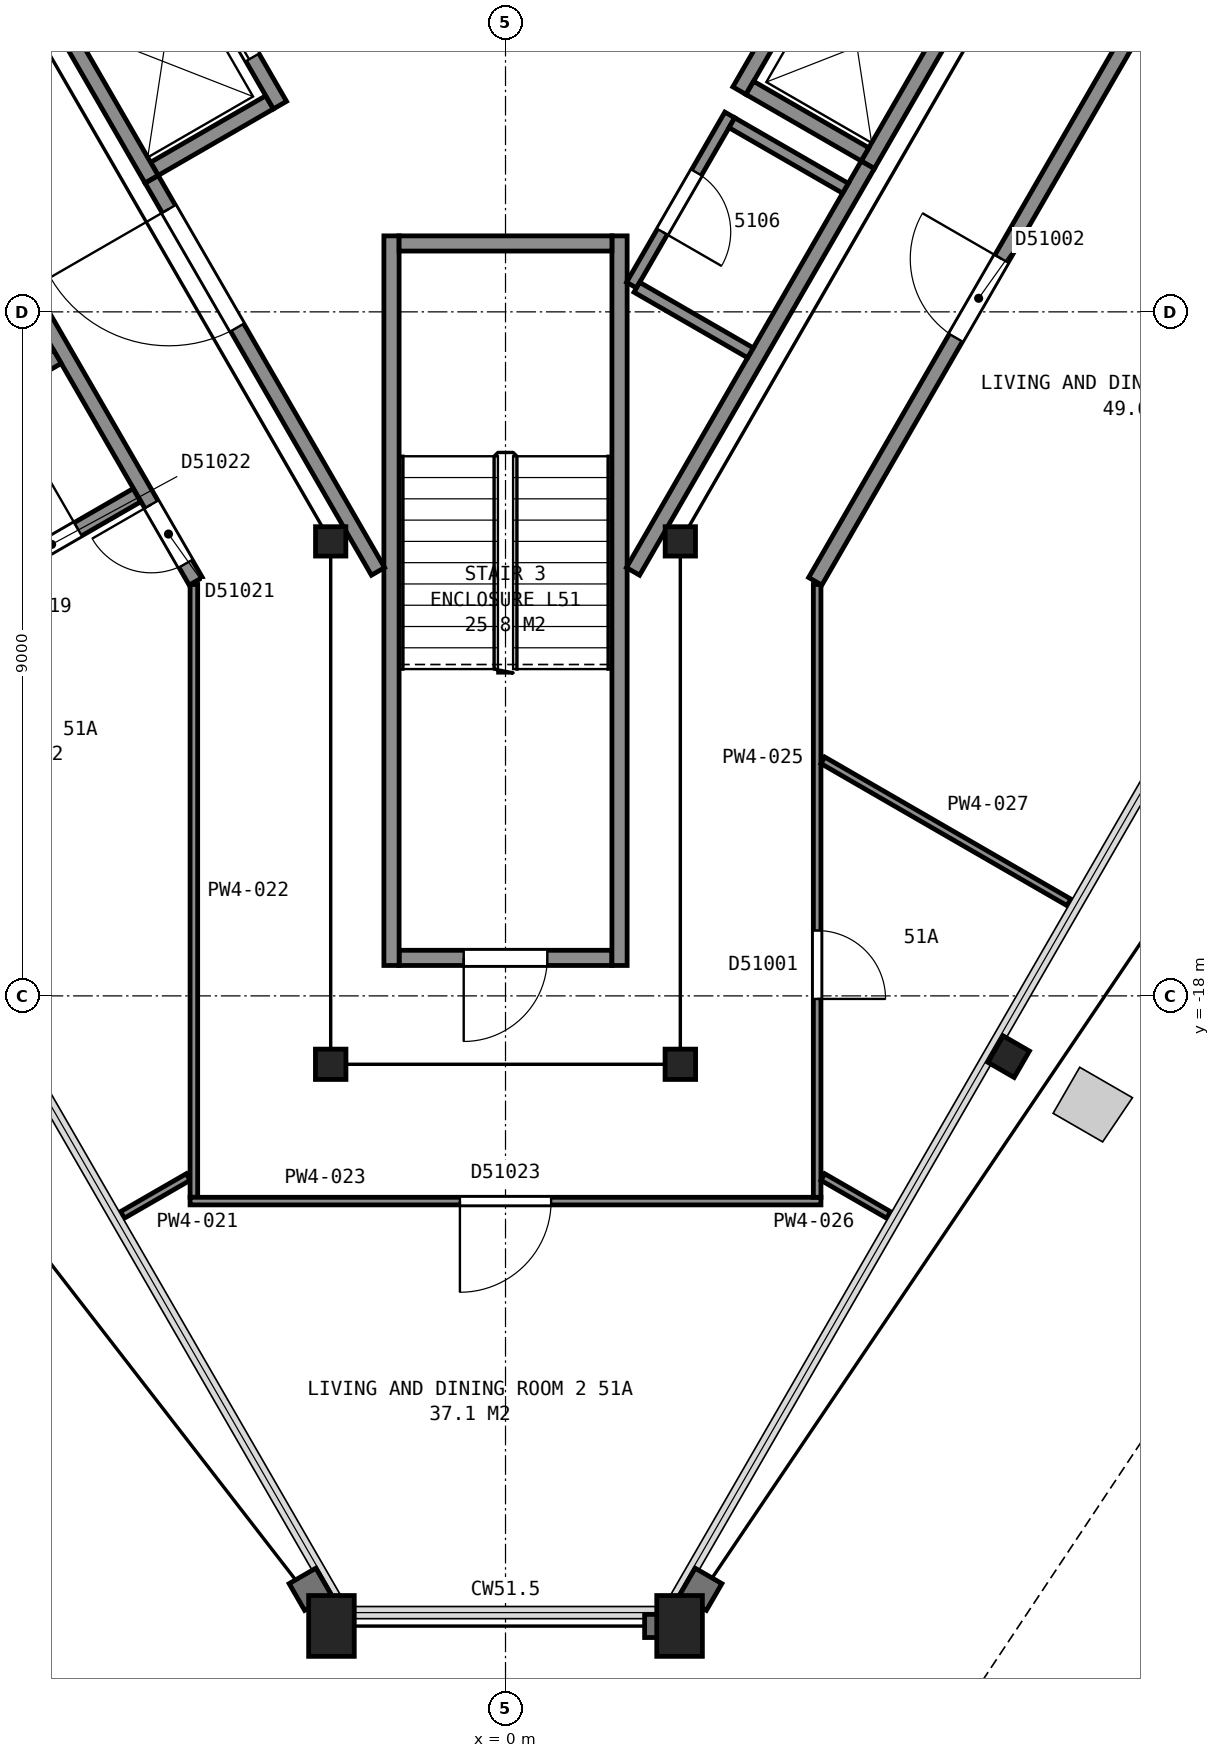
"""IFC4 building model, lengths in metres.
Left out: names, types, materials, properties, quantities, classifications, styles, units other than length and angle.
Written with IfcOpenShell. Run it as: python <this file> out.ifc"""

import sys

from ifc_helpers import new_model, si_unit, direction, frame, frame_2d, origin, origin_2d, place, context, subcontext, project, spatial, rectangle, hollow_rectangle, i_section, extrude, element, fill, save


model = new_model("IFC4")
c1 = context("Model", 3, precision=1e-05, world=origin(), true_north=direction((0.0, 1.0)))
c2 = subcontext(c1, "Body", "Model", "MODEL_VIEW")
j1 = project(units=[si_unit("LENGTHUNIT", "METRE"), si_unit("PLANEANGLEUNIT", "RADIAN")], contexts=[c1])
p1 = place(None, origin())
s1 = spatial("IfcSite", under=j1, at=p1, CompositionType="ELEMENT")
p2 = place(p1, origin())
s2 = spatial("IfcBuilding", under=s1, at=p2, CompositionType="ELEMENT")
p3 = place(p2, frame((0.0, 0.0, 206.4)))
s3 = spatial("IfcBuildingStorey", under=s2, at=p3, CompositionType="ELEMENT", Elevation=206.4)
for number, where, z_axis, x_axis in (
    (1, (-2.29, -26.29, 0.0), (0.0, 0.0, 1.0), (-1.0, 0.0, 0.0)),
    (2, (2.29, -26.29, 0.0), (0.0, 0.0, 1.0), (-1.0, 0.0, 0.0)),
):
    element("IfcColumn", number, at=place(p3, frame(where, z_axis=z_axis, x_axis=x_axis)), inside=s3, PredefinedType="COLUMN", context=c2, shape_type="SweptSolid", body=[
        extrude(hollow_rectangle(XDim=0.6, YDim=0.8, WallThickness=0.05, at=origin_2d()), origin(), (0.0, 0.0, 1.0), 3.7),
    ])
p4 = place(p3, frame((6.62, -18.8, 0.0), z_axis=(0.0, 0.0, 1.0), x_axis=(-0.5, -0.866025403784, 0.0)))
e3 = element("IfcColumn", 3, at=p4, inside=s3, PredefinedType="COLUMN", context=c2, shape_type="SweptSolid", body=[
    extrude(i_section(OverallWidth=0.401, OverallDepth=0.399, WebThickness=0.025, FlangeThickness=0.04, FilletRadius=0.015, at=origin_2d()), origin(), (0.0, 0.0, 1.0), 3.7),
])
p5 = place(p3, frame((-2.3, -12.02, 0.0), z_axis=(0.0, 0.0, 1.0), x_axis=(1.0, 0.0, 0.0)))
e4 = element("IfcColumn", 4, at=p5, inside=s3, PredefinedType="COLUMN", context=c2, shape_type="SweptSolid", body=[
    extrude(i_section(OverallWidth=0.399, OverallDepth=0.386, WebThickness=0.021, FlangeThickness=0.033, FilletRadius=0.015, at=origin_2d()), origin(), (0.0, 0.0, 1.0), 3.7),
])
for number, where, z_axis, x_axis in (
    (5, (-2.3, -18.9, 0.0), (0.0, 0.0, 1.0), (-1.0, 0.0, 0.0)),
    (6, (2.3, -18.9, 0.0), (0.0, 0.0, 1.0), (-1.0, 0.0, 0.0)),
):
    element("IfcColumn", number, at=place(p3, frame(where, z_axis=z_axis, x_axis=x_axis)), inside=s3, PredefinedType="COLUMN", context=c2, shape_type="SweptSolid", body=[
        extrude(i_section(OverallWidth=0.401, OverallDepth=0.399, WebThickness=0.025, FlangeThickness=0.04, FilletRadius=0.015, at=origin_2d()), origin(), (0.0, 0.0, 1.0), 3.7),
    ])
p6 = place(p3, frame((2.3, -12.02, 0.0), z_axis=(0.0, 0.0, 1.0), x_axis=(1.0, 0.0, 0.0)))
e7 = element("IfcColumn", 7, at=p6, inside=s3, PredefinedType="COLUMN", context=c2, shape_type="SweptSolid", body=[
    extrude(i_section(OverallWidth=0.399, OverallDepth=0.386, WebThickness=0.021, FlangeThickness=0.033, FilletRadius=0.015, at=origin_2d()), origin(), (0.0, 0.0, 1.0), 3.7),
])
p7 = place(p3, frame((-1.4, -17.5, 0.0), z_axis=(0.0, 0.0, 1.0), x_axis=(1.0, 0.0, 0.0)))
e8 = element("IfcWall", 8, at=p7, inside=s3, PredefinedType="PARTITIONING", context=c2, shape_type="SweptSolid", body=[
    extrude(rectangle(XDim=2.8, YDim=0.2, at=frame_2d((1.4, 0.0))), origin(), (0.0, 0.0, 1.0), 3.45),
])
p8 = place(p7, frame((0.85, 0.0, 0.0)))
e9 = element("IfcOpeningElement", 9, at=p8, cuts=e8, PredefinedType="OPENING", context=c2, shape_type="SweptSolid", body=[
    extrude(rectangle(XDim=1.1, YDim=2.1, at=frame_2d((0.55, 1.05))), frame((0.0, 0.11, 0.0), z_axis=(0.0, -1.0, 0.0), x_axis=(1.0, 0.0, 0.0)), (0.0, 0.0, 1.0), 0.22),
])
for number, where, z_axis, x_axis in (
    (10, (1.5, -8.0, 0.0), (0.0, 0.0, 1.0), (0.0, -1.0, 0.0)),
    (11, (-1.5, -8.0, 0.0), (0.0, 0.0, 1.0), (0.0, -1.0, 0.0)),
):
    element("IfcWall", number, at=place(p3, frame(where, z_axis=z_axis, x_axis=x_axis)), inside=s3, PredefinedType="PARTITIONING", context=c2, shape_type="SweptSolid", body=[
        extrude(rectangle(XDim=9.6, YDim=0.2, at=frame_2d((4.8, 0.0))), origin(), (0.0, 0.0, 1.0), 3.45),
    ])
p9 = place(p3, frame((-1.4, -8.1, 0.0), z_axis=(0.0, 0.0, 1.0), x_axis=(1.0, 0.0, 0.0)))
e12 = element("IfcWall", 12, at=p9, inside=s3, PredefinedType="PARTITIONING", context=c2, shape_type="SweptSolid", body=[
    extrude(rectangle(XDim=2.8, YDim=0.2, at=frame_2d((1.4, 0.0))), origin(), (0.0, 0.0, 1.0), 3.45),
])
p10 = place(p3, frame((-4.62, -7.118, 0.0), z_axis=(0.0, 0.0, 1.0), x_axis=(0.866036909293, 0.499980071345, 0.0)))
e13 = element("IfcWall", 13, at=p10, inside=s3, PredefinedType="PARTITIONING", context=c2, shape_type="SweptSolid", body=[
    extrude(rectangle(XDim=1.75, YDim=0.2, at=frame_2d((0.875, 0.0))), origin(), (0.0, 0.0, 1.0), 3.7),
])
p11 = place(p3, frame((4.766, -7.065, 0.0), z_axis=(0.0, 0.0, 1.0), x_axis=(0.499948979701, 0.866054858364, 0.0)))
e14 = element("IfcWall", 14, at=p11, inside=s3, PredefinedType="PARTITIONING", context=c2, shape_type="SweptSolid", body=[
    extrude(rectangle(XDim=2.55, YDim=0.2, at=frame_2d((1.275, 0.0))), origin(), (0.0, 0.0, 1.0), 3.7),
])
p12 = place(p3, frame((3.077, -6.09, 0.0), z_axis=(0.0, 0.0, 1.0), x_axis=(0.500062241894, 0.865989465428, 0.0)))
e15 = element("IfcWall", 15, at=p12, inside=s3, PredefinedType="PARTITIONING", context=c2, shape_type="SweptSolid", body=[
    extrude(rectangle(XDim=2.55, YDim=0.2, at=frame_2d((1.275, 0.0))), origin(), (0.0, 0.0, 1.0), 3.7),
])
p13 = place(p12, frame((0.725, 0.0, 0.0)))
e16 = element("IfcOpeningElement", 16, at=p13, cuts=e15, PredefinedType="OPENING", context=c2, shape_type="SweptSolid", body=[
    extrude(rectangle(XDim=1.1, YDim=2.1, at=frame_2d((0.55, 1.05))), frame((0.0, 0.11, 0.0), z_axis=(0.0, -1.0, 0.0), x_axis=(1.0, 0.0, 0.0)), (0.0, 0.0, 1.0), 0.22),
])
p14 = place(p3, frame((-2.968, -6.28, 0.0), z_axis=(0.0, 0.0, 1.0), x_axis=(-0.499990435942, 0.866030925526, 0.0)))
e17 = element("IfcWall", 17, at=p14, inside=s3, PredefinedType="PARTITIONING", context=c2, shape_type="SweptSolid", body=[
    extrude(rectangle(XDim=2.55, YDim=0.2, at=frame_2d((1.275, 0.0))), origin(), (0.0, 0.0, 1.0), 3.7),
])
p15 = place(p14, frame((0.725, 0.0, 0.0)))
e18 = element("IfcOpeningElement", 18, at=p15, cuts=e17, PredefinedType="OPENING", context=c2, shape_type="SweptSolid", body=[
    extrude(rectangle(XDim=1.1, YDim=2.1, at=frame_2d((0.55, 1.05))), frame((0.0, 0.11, 0.0), z_axis=(0.0, -1.0, 0.0), x_axis=(1.0, 0.0, 0.0)), (0.0, 0.0, 1.0), 0.22),
])
p16 = place(p3, frame((-4.656, -7.255, 0.0), z_axis=(0.0, 0.0, 1.0), x_axis=(-0.499990435942, 0.866030925526, 0.0)))
e19 = element("IfcWall", 19, at=p16, inside=s3, PredefinedType="PARTITIONING", context=c2, shape_type="SweptSolid", body=[
    extrude(rectangle(XDim=2.55, YDim=0.2, at=frame_2d((1.275, 0.0))), origin(), (0.0, 0.0, 1.0), 3.7),
])
p17 = place(p3, frame((4.73, -6.928, 0.0), z_axis=(0.0, 0.0, 1.0), x_axis=(-0.866036909293, 0.499980071345, 0.0)))
e20 = element("IfcWall", 20, at=p17, inside=s3, PredefinedType="PARTITIONING", context=c2, shape_type="SweptSolid", body=[
    extrude(rectangle(XDim=1.75, YDim=0.2, at=frame_2d((0.875, 0.0))), origin(), (0.0, 0.0, 1.0), 3.7),
])
p18 = place(p3, frame((-4.655, -7.257, 0.0), z_axis=(0.0, 0.0, 1.0), x_axis=(0.499966124405, -0.866044960985, 0.0)))
e21 = element("IfcWall", 21, at=p18, inside=s3, PredefinedType="PARTITIONING", context=c2, shape_type="SweptSolid", body=[
    extrude(rectangle(XDim=5.956, YDim=0.2, at=frame_2d((2.978, 0.0))), origin(), (0.0, 0.0, 1.0), 3.45),
])
p19 = place(p18, frame((0.45, 0.0, 0.0)))
e22 = element("IfcOpeningElement", 22, at=p19, cuts=e21, PredefinedType="OPENING", context=c2, shape_type="SweptSolid", body=[
    extrude(rectangle(XDim=1.8, YDim=2.1, at=frame_2d((0.9, 1.05))), frame((0.0, 0.11, 0.0), z_axis=(0.0, -1.0, 0.0), x_axis=(1.0, 0.0, 0.0)), (0.0, 0.0, 1.0), 0.22),
])
p20 = place(p3, frame((1.677, -12.415, 0.0), z_axis=(0.0, 0.0, 1.0), x_axis=(0.500054337157, 0.865994029939, 0.0)))
e23 = element("IfcWall", 23, at=p20, inside=s3, PredefinedType="PARTITIONING", context=c2, shape_type="SweptSolid", body=[
    extrude(rectangle(XDim=6.177, YDim=0.2, at=frame_2d((3.088, 0.0))), origin(), (0.0, 0.0, 1.0), 3.45),
])
p21 = place(p3, frame((2.95, -6.409, 0.0), z_axis=(0.0, 0.0, 1.0), x_axis=(-0.499978610854, -0.866037752461, 0.0)))
e24 = element("IfcWall", 24, at=p21, inside=s3, PredefinedType="PARTITIONING", context=c2, shape_type="SweptSolid", body=[
    extrude(rectangle(XDim=2.585, YDim=0.15, at=frame_2d((1.292, 0.0))), origin(), (0.0, 0.0, 1.0), 3.45),
])
p22 = place(p21, frame((0.875, 0.0, 0.0)))
e25 = element("IfcOpeningElement", 25, at=p22, cuts=e24, PredefinedType="OPENING", context=c2, shape_type="SweptSolid", body=[
    extrude(rectangle(XDim=0.9, YDim=2.1, at=frame_2d((0.45, 1.05))), frame((0.0, 0.085, 0.0), z_axis=(0.0, -1.0, 0.0), x_axis=(1.0, 0.0, 0.0)), (0.0, 0.0, 1.0), 0.17),
])
for number, where, z_axis, x_axis in (
    (26, (1.728, -8.677, 0.0), (0.0, 0.0, 1.0), (0.866, -0.5, 0.0)),
    (27, (2.978, -6.511, 0.0), (0.0, 0.0, 1.0), (0.866, -0.5, 0.0)),
):
    element("IfcWall", number, at=place(p3, frame(where, z_axis=z_axis, x_axis=x_axis)), inside=s3, PredefinedType="PARTITIONING", context=c2, shape_type="SweptSolid", body=[
        extrude(rectangle(XDim=1.725, YDim=0.15, at=frame_2d((0.863, 0.0))), origin(), (0.0, 0.0, 1.0), 3.45),
    ])
p23 = place(p3, frame((-4.075, -12.545, 0.0), z_axis=(0.0, 0.0, 1.0), x_axis=(-0.499999743747, 0.866025551732, 0.0)))
e28 = element("IfcWall", 28, at=p23, inside=s3, PredefinedType="PARTITIONING", context=c2, shape_type="SweptSolid", body=[
    extrude(rectangle(XDim=17.656, YDim=0.2, at=frame_2d((8.828, 0.0))), origin(), (0.0, 0.0, 1.0), 2.713),
])
p24 = place(p23, frame((9.895, 0.0, 0.0)))
e29 = element("IfcOpeningElement", 29, at=p24, cuts=e28, PredefinedType="OPENING", context=c2, shape_type="SweptSolid", body=[
    extrude(rectangle(XDim=0.9, YDim=2.1, at=frame_2d((0.45, 1.05))), frame((0.0, 0.11, 0.0), z_axis=(0.0, -1.0, 0.0), x_axis=(1.0, 0.0, 0.0)), (0.0, 0.0, 1.0), 0.22),
])
p25 = place(p23, frame((6.622, 0.0, 0.0)))
e30 = element("IfcOpeningElement", 30, at=p25, cuts=e28, PredefinedType="OPENING", context=c2, shape_type="SweptSolid", body=[
    extrude(rectangle(XDim=0.9, YDim=2.1, at=frame_2d((0.45, 1.05))), frame((0.0, 0.11, 0.0), z_axis=(0.0, -1.0, 0.0), x_axis=(1.0, 0.0, 0.0)), (0.0, 0.0, 1.0), 0.22),
])
p26 = place(p23, frame((0.268, 0.0, 0.0)))
e31 = element("IfcOpeningElement", 31, at=p26, cuts=e28, PredefinedType="OPENING", context=c2, shape_type="SweptSolid", body=[
    extrude(rectangle(XDim=0.9, YDim=2.1, at=frame_2d((0.45, 1.05))), frame((0.0, 0.11, 0.0), z_axis=(0.0, -1.0, 0.0), x_axis=(1.0, 0.0, 0.0)), (0.0, 0.0, 1.0), 0.22),
])
p27 = place(p3, frame((-10.143, -12.043, 0.0), z_axis=(0.0, 0.0, 1.0), x_axis=(0.866136679459, 0.49980721533, 0.0)))
e32 = element("IfcWall", 32, at=p27, inside=s3, PredefinedType="PARTITIONING", context=c2, shape_type="SweptSolid", body=[
    extrude(rectangle(XDim=4.904, YDim=0.2, at=frame_2d((2.452, 0.0))), origin(), (0.0, 0.0, 1.0), 2.713),
])
p28 = place(p3, frame((-7.271, -12.81, 0.0), z_axis=(0.0, 0.0, 1.0), x_axis=(0.866041588165, 0.499971966783, 0.0)))
e33 = element("IfcWall", 33, at=p28, inside=s3, PredefinedType="PARTITIONING", context=c2, shape_type="SweptSolid", body=[
    extrude(rectangle(XDim=2.795, YDim=0.2, at=frame_2d((1.397, 0.0))), origin(), (0.0, 0.0, 1.0), 2.713),
])
p29 = place(p28, frame((1.1, 0.0, 0.0)))
e34 = element("IfcOpeningElement", 34, at=p29, cuts=e33, PredefinedType="OPENING", context=c2, shape_type="SweptSolid", body=[
    extrude(rectangle(XDim=0.8, YDim=2.1, at=frame_2d((0.4, 1.05))), frame((0.0, 0.11, 0.0), z_axis=(0.0, -1.0, 0.0), x_axis=(1.0, 0.0, 0.0)), (0.0, 0.0, 1.0), 0.22),
])
p30 = place(p3, frame((-5.04, -20.882, 0.0), z_axis=(0.0, 0.0, 1.0), x_axis=(0.866234439787, 0.499637764112, 0.0)))
e35 = element("IfcWall", 35, at=p30, inside=s3, PredefinedType="PARTITIONING", context=c2, shape_type="SweptSolid", body=[
    extrude(rectangle(XDim=0.998, YDim=0.1, at=frame_2d((0.499, 0.0))), origin(), (0.0, 0.0, 1.0), 2.713),
])
p31 = place(p3, frame((-4.1, -20.65, 0.0), z_axis=(0.0, 0.0, 1.0), x_axis=(0.0, 1.0, 0.0)))
e36 = element("IfcWall", 36, at=p31, inside=s3, PredefinedType="PARTITIONING", context=c2, shape_type="SweptSolid", body=[
    extrude(rectangle(XDim=8.063, YDim=0.1, at=frame_2d((4.031, 0.0))), origin(), (0.0, 0.0, 1.0), 2.713),
])
p32 = place(p3, frame((4.15, -20.7, 0.0), z_axis=(0.0, 0.0, 1.0), x_axis=(-1.0, 0.0, 0.0)))
e37 = element("IfcWall", 37, at=p32, inside=s3, PredefinedType="PARTITIONING", context=c2, shape_type="SweptSolid", body=[
    extrude(rectangle(XDim=8.3, YDim=0.1, at=frame_2d((4.15, 0.0))), origin(), (0.0, 0.0, 1.0), 2.713),
])
p33 = place(p32, frame((3.55, 0.0, 0.0)))
e38 = element("IfcOpeningElement", 38, at=p33, cuts=e37, PredefinedType="OPENING", context=c2, shape_type="SweptSolid", body=[
    extrude(rectangle(XDim=1.2, YDim=2.1, at=frame_2d((0.6, 1.05))), frame((0.0, 0.06, 0.0), z_axis=(0.0, -1.0, 0.0), x_axis=(1.0, 0.0, 0.0)), (0.0, 0.0, 1.0), 0.12),
])
p34 = place(p3, frame((4.1, -12.587, 0.0), z_axis=(0.0, 0.0, 1.0), x_axis=(0.0, -1.0, 0.0)))
e39 = element("IfcWall", 39, at=p34, inside=s3, PredefinedType="PARTITIONING", context=c2, shape_type="SweptSolid", body=[
    extrude(rectangle(XDim=8.063, YDim=0.1, at=frame_2d((4.031, 0.0))), origin(), (0.0, 0.0, 1.0), 2.713),
])
p35 = place(p34, frame((4.553, 0.0, 0.0)))
e40 = element("IfcOpeningElement", 40, at=p35, cuts=e39, PredefinedType="OPENING", context=c2, shape_type="SweptSolid", body=[
    extrude(rectangle(XDim=0.9, YDim=2.1, at=frame_2d((0.45, 1.05))), frame((0.0, 0.06, 0.0), z_axis=(0.0, -1.0, 0.0), x_axis=(1.0, 0.0, 0.0)), (0.0, 0.0, 1.0), 0.12),
])
p36 = place(p3, frame((4.175, -20.383, 0.0), z_axis=(0.0, 0.0, 1.0), x_axis=(0.866234439787, -0.499637764112, 0.0)))
e41 = element("IfcWall", 41, at=p36, inside=s3, PredefinedType="PARTITIONING", context=c2, shape_type="SweptSolid", body=[
    extrude(rectangle(XDim=0.998, YDim=0.1, at=frame_2d((0.499, 0.0))), origin(), (0.0, 0.0, 1.0), 2.713),
])
p37 = place(p3, frame((4.175, -14.9, 0.0), z_axis=(0.0, 0.0, 1.0), x_axis=(0.866057308191, -0.499944735875, 0.0)))
e42 = element("IfcWall", 42, at=p37, inside=s3, PredefinedType="PARTITIONING", context=c2, shape_type="SweptSolid", body=[
    extrude(rectangle(XDim=3.74, YDim=0.1, at=frame_2d((1.87, 0.0))), origin(), (0.0, 0.0, 1.0), 2.713),
])
p38 = place(p3, frame((12.903, 2.745, 0.0), z_axis=(0.0, 0.0, 1.0), x_axis=(-0.499999743747, -0.866025551732, 0.0)))
e43 = element("IfcWall", 43, at=p38, inside=s3, PredefinedType="PARTITIONING", context=c2, shape_type="SweptSolid", body=[
    extrude(rectangle(XDim=17.656, YDim=0.2, at=frame_2d((8.828, 0.0))), origin(), (0.0, 0.0, 1.0), 2.713),
])
p39 = place(p38, frame((12.756, 0.0, 0.0)))
e44 = element("IfcOpeningElement", 44, at=p39, cuts=e43, PredefinedType="OPENING", context=c2, shape_type="SweptSolid", body=[
    extrude(rectangle(XDim=1.2, YDim=2.1, at=frame_2d((0.6, 1.05))), frame((0.0, 0.11, 0.0), z_axis=(0.0, -1.0, 0.0), x_axis=(1.0, 0.0, 0.0)), (0.0, 0.0, 1.0), 0.22),
])
p40 = place(p38, frame((7.044, 0.0, 0.0)))
e45 = element("IfcOpeningElement", 45, at=p40, cuts=e43, PredefinedType="OPENING", context=c2, shape_type="SweptSolid", body=[
    extrude(rectangle(XDim=0.9, YDim=2.1, at=frame_2d((0.45, 1.05))), frame((0.0, 0.11, 0.0), z_axis=(0.0, -1.0, 0.0), x_axis=(1.0, 0.0, 0.0)), (0.0, 0.0, 1.0), 0.22),
])
p41 = place(p38, frame((0.417, 0.0, 0.0)))
e46 = element("IfcOpeningElement", 46, at=p41, cuts=e43, PredefinedType="OPENING", context=c2, shape_type="SweptSolid", body=[
    extrude(rectangle(XDim=0.9, YDim=2.1, at=frame_2d((0.45, 1.05))), frame((0.0, 0.11, 0.0), z_axis=(0.0, -1.0, 0.0), x_axis=(1.0, 0.0, 0.0)), (0.0, 0.0, 1.0), 0.22),
])
p42 = place(p8, origin())
e47 = element("IfcDoor", 47, at=p42, inside=s3, OperationType="SINGLE_SWING_LEFT", PredefinedType="DOOR", context=c2, shape_type="SweptSolid", body=[
    extrude(rectangle(XDim=1.1, YDim=2.1, at=frame_2d((0.55, 1.05))), frame((0.0, 0.025, 0.0), z_axis=(0.0, -1.0, 0.0), x_axis=(1.0, 0.0, 0.0)), (0.0, 0.0, 1.0), 0.05),
])
fill(e9, e47)
p43 = place(p15, origin())
e48 = element("IfcDoor", 48, at=p43, inside=s3, OperationType="SLIDING_TO_RIGHT", PredefinedType="DOOR", context=c2, shape_type="SweptSolid", body=[
    extrude(rectangle(XDim=1.1, YDim=2.1, at=frame_2d((0.55, 1.05))), frame((0.0, 0.025, 0.0), z_axis=(0.0, -1.0, 0.0), x_axis=(1.0, 0.0, 0.0)), (0.0, 0.0, 1.0), 0.05),
])
fill(e18, e48)
p44 = place(p19, origin())
e49 = element("IfcDoor", 49, at=p44, inside=s3, OperationType="DOUBLE_DOOR_SINGLE_SWING", PredefinedType="DOOR", context=c2, shape_type="SweptSolid", body=[
    extrude(rectangle(XDim=1.8, YDim=2.1, at=frame_2d((0.9, 1.05))), frame((0.0, 0.025, 0.0), z_axis=(0.0, -1.0, 0.0), x_axis=(1.0, 0.0, 0.0)), (0.0, 0.0, 1.0), 0.05),
])
fill(e22, e49)
p45 = place(p22, origin())
e50 = element("IfcDoor", 50, at=p45, inside=s3, OperationType="SINGLE_SWING_RIGHT", PredefinedType="DOOR", context=c2, shape_type="SweptSolid", body=[
    extrude(rectangle(XDim=0.9, YDim=2.1, at=frame_2d((0.45, 1.05))), frame((0.0, 0.025, 0.0), z_axis=(0.0, -1.0, 0.0), x_axis=(1.0, 0.0, 0.0)), (0.0, 0.0, 1.0), 0.05),
])
fill(e25, e50)
p46 = place(p26, origin())
e51 = element("IfcDoor", 51, at=p46, inside=s3, OperationType="SINGLE_SWING_RIGHT", PredefinedType="DOOR", context=c2, shape_type="SweptSolid", body=[
    extrude(rectangle(XDim=0.9, YDim=2.1, at=frame_2d((0.45, 1.05))), frame((0.0, 0.025, 0.0), z_axis=(0.0, -1.0, 0.0), x_axis=(1.0, 0.0, 0.0)), (0.0, 0.0, 1.0), 0.05),
])
fill(e31, e51)
p47 = place(p29, origin())
e52 = element("IfcDoor", 52, at=p47, inside=s3, OperationType="SINGLE_SWING_RIGHT", PredefinedType="DOOR", context=c2, shape_type="SweptSolid", body=[
    extrude(rectangle(XDim=0.8, YDim=2.1, at=frame_2d((0.4, 1.05))), frame((0.0, 0.025, 0.0), z_axis=(0.0, -1.0, 0.0), x_axis=(1.0, 0.0, 0.0)), (0.0, 0.0, 1.0), 0.05),
])
fill(e34, e52)
p48 = place(p33, origin())
e53 = element("IfcDoor", 53, at=p48, inside=s3, OperationType="SINGLE_SWING_RIGHT", PredefinedType="DOOR", context=c2, shape_type="SweptSolid", body=[
    extrude(rectangle(XDim=1.2, YDim=2.1, at=frame_2d((0.6, 1.05))), frame((0.0, 0.025, 0.0), z_axis=(0.0, -1.0, 0.0), x_axis=(1.0, 0.0, 0.0)), (0.0, 0.0, 1.0), 0.05),
])
fill(e38, e53)
p49 = place(p35, origin())
e54 = element("IfcDoor", 54, at=p49, inside=s3, OperationType="SINGLE_SWING_RIGHT", PredefinedType="DOOR", context=c2, shape_type="SweptSolid", body=[
    extrude(rectangle(XDim=0.9, YDim=2.1, at=frame_2d((0.45, 1.05))), frame((0.0, 0.025, 0.0), z_axis=(0.0, -1.0, 0.0), x_axis=(1.0, 0.0, 0.0)), (0.0, 0.0, 1.0), 0.05),
])
fill(e40, e54)
p50 = place(p39, origin())
e55 = element("IfcDoor", 55, at=p50, inside=s3, OperationType="SINGLE_SWING_LEFT", PredefinedType="DOOR", context=c2, shape_type="SweptSolid", body=[
    extrude(rectangle(XDim=1.2, YDim=2.1, at=frame_2d((0.6, 1.05))), frame((0.0, 0.025, 0.0), z_axis=(0.0, -1.0, 0.0), x_axis=(1.0, 0.0, 0.0)), (0.0, 0.0, 1.0), 0.05),
])
fill(e44, e55)
save(model, sys.argv[1])
